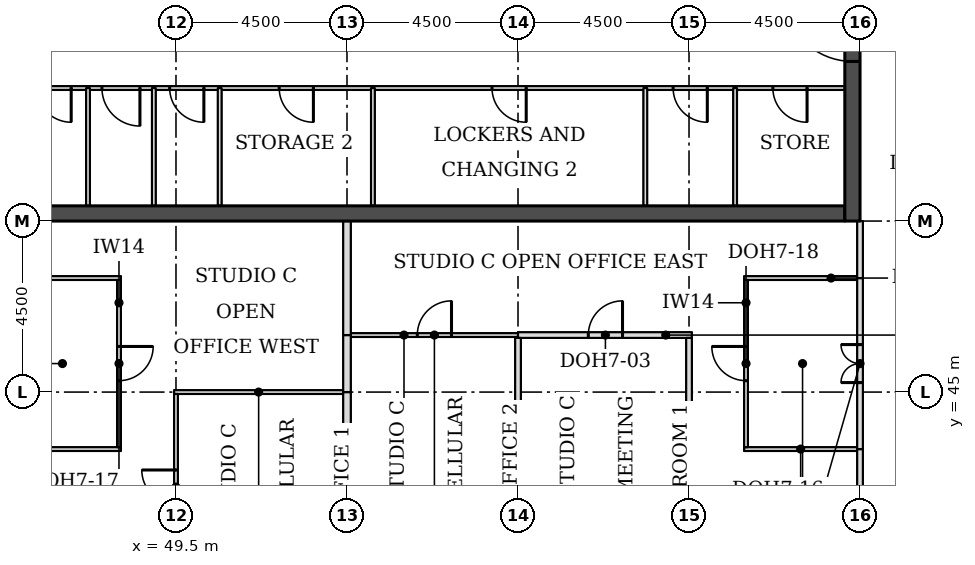
"""IFC4 building model, lengths in metres.
Left out: names, types, materials, properties, quantities, classifications, styles, units other than length and angle.
Written with IfcOpenShell. Run it as: python <this file> out.ifc"""

import sys

from ifc_helpers import new_model, si_unit, direction, frame, frame_2d, origin, place, context, subcontext, project, spatial, rectangle, extrude, element, fill, save


model = new_model("IFC4")
c1 = context("Model", 3, precision=1e-05, world=origin(), true_north=direction((0.0, 1.0)))
c2 = subcontext(c1, "Body", "Model", "MODEL_VIEW")
j1 = project(units=[si_unit("LENGTHUNIT", "METRE"), si_unit("PLANEANGLEUNIT", "RADIAN")], contexts=[c1])
p1 = place(None, origin())
s1 = spatial("IfcSite", under=j1, at=p1, CompositionType="ELEMENT")
p2 = place(p1, origin())
s2 = spatial("IfcBuilding", under=s1, at=p2, CompositionType="ELEMENT")
p3 = place(p2, frame((0.0, 0.0, 192.1)))
s3 = spatial("IfcBuildingStorey", under=s2, at=p3, CompositionType="ELEMENT", Elevation=192.1)
p4 = place(p3, frame((45.4, 49.7, 0.0), z_axis=(0.0, 0.0, 1.0), x_axis=(1.0, 0.0, 0.0)))
e1 = element("IfcWall", 1, at=p4, inside=s3, PredefinedType="SHEAR", context=c2, shape_type="SweptSolid", body=[
    extrude(rectangle(XDim=21.7, YDim=0.4, at=frame_2d((10.85, 0.0))), origin(), (0.0, 0.0, 1.0), 3.7),
])
p5 = place(p3, frame((67.3, 49.5, 0.0), z_axis=(0.0, 0.0, 1.0), x_axis=(0.0, 1.0, 0.0)))
e2 = element("IfcWall", 2, at=p5, inside=s3, PredefinedType="SHEAR", context=c2, shape_type="SweptSolid", body=[
    extrude(rectangle(XDim=22.5, YDim=0.4, at=frame_2d((11.25, 0.0))), origin(), (0.0, 0.0, 1.0), 3.7),
])
p6 = place(p5, frame((4.2, 0.0, 0.0)))
e3 = element("IfcOpeningElement", 3, at=p6, cuts=e2, PredefinedType="OPENING", context=c2, shape_type="SweptSolid", body=[
    extrude(rectangle(XDim=1.8, YDim=2.1, at=frame_2d((0.9, 1.05))), frame((0.0, 0.21, 0.0), z_axis=(0.0, -1.0, 0.0), x_axis=(1.0, 0.0, 0.0)), (0.0, 0.0, 1.0), 0.42),
])
p7 = place(p5, frame((6.9, 0.0, 0.0)))
e4 = element("IfcOpeningElement", 4, at=p7, cuts=e2, PredefinedType="OPENING", context=c2, shape_type="SweptSolid", body=[
    extrude(rectangle(XDim=1.1, YDim=2.1, at=frame_2d((0.55, 1.05))), frame((0.0, 0.21, 0.0), z_axis=(0.0, -1.0, 0.0), x_axis=(1.0, 0.0, 0.0)), (0.0, 0.0, 1.0), 0.42),
])
p8 = place(p5, frame((13.6, 0.0, 0.0)))
e5 = element("IfcOpeningElement", 5, at=p8, cuts=e2, PredefinedType="OPENING", context=c2, shape_type="SweptSolid", body=[
    extrude(rectangle(XDim=1.1, YDim=2.1, at=frame_2d((0.55, 1.05))), frame((0.0, 0.21, 0.0), z_axis=(0.0, -1.0, 0.0), x_axis=(1.0, 0.0, 0.0)), (0.0, 0.0, 1.0), 0.42),
])
p9 = place(p5, frame((16.5, 0.0, 0.0)))
e6 = element("IfcOpeningElement", 6, at=p9, cuts=e2, PredefinedType="OPENING", context=c2, shape_type="SweptSolid", body=[
    extrude(rectangle(XDim=1.8, YDim=2.1, at=frame_2d((0.9, 1.05))), frame((0.0, 0.21, 0.0), z_axis=(0.0, -1.0, 0.0), x_axis=(1.0, 0.0, 0.0)), (0.0, 0.0, 1.0), 0.42),
])
for number, where, z_axis, x_axis in (
    (7, (45.075, 43.5, 0.0), (0.0, 0.0, 1.0), (1.0, 0.0, 0.0)),
    (8, (64.45, 43.5, 0.0), (0.0, 0.0, 1.0), (1.0, 0.0, 0.0)),
):
    element("IfcWall", number, at=place(p3, frame(where, z_axis=z_axis, x_axis=x_axis)), inside=s3, PredefinedType="PARTITIONING", context=c2, shape_type="SweptSolid", body=[
        extrude(rectangle(XDim=2.975, YDim=0.1, at=frame_2d((1.488, 0.0))), origin(), (0.0, 0.0, 1.0), 3.55),
    ])
p10 = place(p3, frame((49.45, 45.0, 0.0), z_axis=(0.0, 0.0, 1.0), x_axis=(1.0, 0.0, 0.0)))
e9 = element("IfcWall", 9, at=p10, inside=s3, PredefinedType="PARTITIONING", context=c2, shape_type="SweptSolid", body=[
    extrude(rectangle(XDim=4.45, YDim=0.1, at=frame_2d((2.225, 0.0))), origin(), (0.0, 0.0, 1.0), 3.55),
])
p11 = place(p3, frame((54.1, 46.5, 0.0), z_axis=(0.0, 0.0, 1.0), x_axis=(1.0, 0.0, 0.0)))
e10 = element("IfcWall", 10, at=p11, inside=s3, PredefinedType="PARTITIONING", context=c2, shape_type="SweptSolid", body=[
    extrude(rectangle(XDim=4.4, YDim=0.1, at=frame_2d((2.2, 0.0))), origin(), (0.0, 0.0, 1.0), 3.55),
])
p12 = place(p11, frame((1.75, 0.0, 0.0)))
e11 = element("IfcOpeningElement", 11, at=p12, cuts=e10, PredefinedType="OPENING", context=c2, shape_type="SweptSolid", body=[
    extrude(rectangle(XDim=0.9, YDim=2.1, at=frame_2d((0.45, 1.05))), frame((0.0, 0.06, 0.0), z_axis=(0.0, -1.0, 0.0), x_axis=(1.0, 0.0, 0.0)), (0.0, 0.0, 1.0), 0.12),
])
p13 = place(p3, frame((58.5, 46.5, 0.0), z_axis=(0.0, 0.0, 1.0), x_axis=(1.0, 0.0, 0.0)))
e12 = element("IfcWall", 12, at=p13, inside=s3, PredefinedType="PARTITIONING", context=c2, shape_type="SweptSolid", body=[
    extrude(rectangle(XDim=4.575, YDim=0.15, at=frame_2d((2.288, 0.0))), origin(), (0.0, 0.0, 1.0), 3.55),
])
p14 = place(p13, frame((1.85, 0.0, 0.0)))
e13 = element("IfcOpeningElement", 13, at=p14, cuts=e12, PredefinedType="OPENING", context=c2, shape_type="SweptSolid", body=[
    extrude(rectangle(XDim=0.9, YDim=2.1, at=frame_2d((0.45, 1.05))), frame((0.0, 0.085, 0.0), z_axis=(0.0, -1.0, 0.0), x_axis=(1.0, 0.0, 0.0)), (0.0, 0.0, 1.0), 0.17),
])
for number, where, z_axis, x_axis in (
    (14, (45.075, 48.0, 0.0), (0.0, 0.0, 1.0), (1.0, 0.0, 0.0)),
    (15, (64.45, 48.0, 0.0), (0.0, 0.0, 1.0), (1.0, 0.0, 0.0)),
):
    element("IfcWall", number, at=place(p3, frame(where, z_axis=z_axis, x_axis=x_axis)), inside=s3, PredefinedType="PARTITIONING", context=c2, shape_type="SweptSolid", body=[
        extrude(rectangle(XDim=2.975, YDim=0.1, at=frame_2d((1.488, 0.0))), origin(), (0.0, 0.0, 1.0), 3.55),
    ])
p15 = place(p3, frame((49.5, 40.05, 0.0), z_axis=(0.0, 0.0, 1.0), x_axis=(0.0, 1.0, 0.0)))
e16 = element("IfcWall", 16, at=p15, inside=s3, PredefinedType="PARTITIONING", context=c2, shape_type="SweptSolid", body=[
    extrude(rectangle(XDim=4.9, YDim=0.1, at=frame_2d((2.45, 0.0))), origin(), (0.0, 0.0, 1.0), 3.55),
])
p16 = place(p15, frame((2.0, 0.0, 0.0)))
e17 = element("IfcOpeningElement", 17, at=p16, cuts=e16, PredefinedType="OPENING", context=c2, shape_type="SweptSolid", body=[
    extrude(rectangle(XDim=0.9, YDim=2.1, at=frame_2d((0.45, 1.05))), frame((0.0, 0.06, 0.0), z_axis=(0.0, -1.0, 0.0), x_axis=(1.0, 0.0, 0.0)), (0.0, 0.0, 1.0), 0.12),
])
p17 = place(p3, frame((54.0, 40.05, 0.0), z_axis=(0.0, 0.0, 1.0), x_axis=(0.0, 1.0, 0.0)))
e18 = element("IfcWall", 18, at=p17, inside=s3, PredefinedType="PARTITIONING", context=c2, shape_type="SweptSolid", body=[
    extrude(rectangle(XDim=4.95, YDim=0.2, at=frame_2d((2.475, 0.0))), origin(), (0.0, 0.0, 1.0), 3.55),
])
for number, where, z_axis, x_axis in (
    (19, (58.5, 40.05, 0.0), (0.0, 0.0, 1.0), (0.0, 1.0, 0.0)),
    (20, (63.0, 40.05, 0.0), (0.0, 0.0, 1.0), (0.0, 1.0, 0.0)),
):
    element("IfcWall", number, at=place(p3, frame(where, z_axis=z_axis, x_axis=x_axis)), inside=s3, PredefinedType="PARTITIONING", context=c2, shape_type="SweptSolid", body=[
        extrude(rectangle(XDim=6.375, YDim=0.15, at=frame_2d((3.188, 0.0))), origin(), (0.0, 0.0, 1.0), 3.55),
    ])
p18 = place(p3, frame((67.5, 40.05, 0.0), z_axis=(0.0, 0.0, 1.0), x_axis=(0.0, 1.0, 0.0)))
e21 = element("IfcWall", 21, at=p18, inside=s3, PredefinedType="PARTITIONING", context=c2, shape_type="SweptSolid", body=[
    extrude(rectangle(XDim=3.45, YDim=0.15, at=frame_2d((1.725, 0.0))), origin(), (0.0, 0.0, 1.0), 3.022),
])
p19 = place(p3, frame((67.5, 43.5, 0.0), z_axis=(0.0, 0.0, 1.0), x_axis=(0.0, 1.0, 0.0)))
e22 = element("IfcWall", 22, at=p19, inside=s3, PredefinedType="PARTITIONING", context=c2, shape_type="SweptSolid", body=[
    extrude(rectangle(XDim=4.5, YDim=0.15, at=frame_2d((2.25, 0.0))), origin(), (0.0, 0.0, 1.0), 3.022),
])
p20 = place(p19, frame((1.75, 0.0, 0.0)))
e23 = element("IfcOpeningElement", 23, at=p20, cuts=e22, PredefinedType="OPENING", context=c2, shape_type="SweptSolid", body=[
    extrude(rectangle(XDim=1.0, YDim=2.1, at=frame_2d((0.5, 1.05))), frame((0.0, 0.085, 0.0), z_axis=(0.0, -1.0, 0.0), x_axis=(1.0, 0.0, 0.0)), (0.0, 0.0, 1.0), 0.17),
])
p21 = place(p3, frame((48.0, 43.55, 0.0), z_axis=(0.0, 0.0, 1.0), x_axis=(0.0, 1.0, 0.0)))
e24 = element("IfcWall", 24, at=p21, inside=s3, PredefinedType="PARTITIONING", context=c2, shape_type="SweptSolid", body=[
    extrude(rectangle(XDim=4.4, YDim=0.1, at=frame_2d((2.2, 0.0))), origin(), (0.0, 0.0, 1.0), 3.55),
])
p22 = place(p21, frame((1.75, 0.0, 0.0)))
e25 = element("IfcOpeningElement", 25, at=p22, cuts=e24, PredefinedType="OPENING", context=c2, shape_type="SweptSolid", body=[
    extrude(rectangle(XDim=0.9, YDim=2.1, at=frame_2d((0.45, 1.05))), frame((0.0, 0.06, 0.0), z_axis=(0.0, -1.0, 0.0), x_axis=(1.0, 0.0, 0.0)), (0.0, 0.0, 1.0), 0.12),
])
p23 = place(p3, frame((64.5, 43.55, 0.0), z_axis=(0.0, 0.0, 1.0), x_axis=(0.0, 1.0, 0.0)))
e26 = element("IfcWall", 26, at=p23, inside=s3, PredefinedType="PARTITIONING", context=c2, shape_type="SweptSolid", body=[
    extrude(rectangle(XDim=4.4, YDim=0.1, at=frame_2d((2.2, 0.0))), origin(), (0.0, 0.0, 1.0), 3.55),
])
p24 = place(p23, frame((1.75, 0.0, 0.0)))
e27 = element("IfcOpeningElement", 27, at=p24, cuts=e26, PredefinedType="OPENING", context=c2, shape_type="SweptSolid", body=[
    extrude(rectangle(XDim=0.9, YDim=2.1, at=frame_2d((0.45, 1.05))), frame((0.0, 0.06, 0.0), z_axis=(0.0, -1.0, 0.0), x_axis=(1.0, 0.0, 0.0)), (0.0, 0.0, 1.0), 0.12),
])
p25 = place(p3, frame((54.0, 45.0, 0.0), z_axis=(0.0, 0.0, 1.0), x_axis=(0.0, 1.0, 0.0)))
e28 = element("IfcWall", 28, at=p25, inside=s3, PredefinedType="PARTITIONING", context=c2, shape_type="SweptSolid", body=[
    extrude(rectangle(XDim=1.5, YDim=0.2, at=frame_2d((0.75, 0.0))), origin(), (0.0, 0.0, 1.0), 3.55),
])
p26 = place(p3, frame((54.0, 46.5, 0.0), z_axis=(0.0, 0.0, 1.0), x_axis=(0.0, 1.0, 0.0)))
e29 = element("IfcWall", 29, at=p26, inside=s3, PredefinedType="PARTITIONING", context=c2, shape_type="SweptSolid", body=[
    extrude(rectangle(XDim=3.0, YDim=0.2, at=frame_2d((1.5, 0.0))), origin(), (0.0, 0.0, 1.0), 3.55),
])
p27 = place(p3, frame((67.5, 48.0, 0.0), z_axis=(0.0, 0.0, 1.0), x_axis=(0.0, 1.0, 0.0)))
e30 = element("IfcWall", 30, at=p27, inside=s3, PredefinedType="PARTITIONING", context=c2, shape_type="SweptSolid", body=[
    extrude(rectangle(XDim=1.5, YDim=0.15, at=frame_2d((0.75, 0.0))), origin(), (0.0, 0.0, 1.0), 3.022),
])
p28 = place(p3, frame((45.4, 53.0, 0.0), z_axis=(0.0, 0.0, 1.0), x_axis=(1.0, 0.0, 0.0)))
e31 = element("IfcWall", 31, at=p28, inside=s3, PredefinedType="PARTITIONING", context=c2, shape_type="SweptSolid", body=[
    extrude(rectangle(XDim=21.7, YDim=0.1, at=frame_2d((10.85, 0.0))), origin(), (0.0, 0.0, 1.0), 3.55),
])
p29 = place(p28, frame((19.806, 0.0, 0.0)))
e32 = element("IfcOpeningElement", 32, at=p29, cuts=e31, PredefinedType="OPENING", context=c2, shape_type="SweptSolid", body=[
    extrude(rectangle(XDim=0.9, YDim=2.1, at=frame_2d((0.45, 1.05))), frame((0.0, 0.06, 0.0), z_axis=(0.0, -1.0, 0.0), x_axis=(1.0, 0.0, 0.0)), (0.0, 0.0, 1.0), 0.12),
])
p30 = place(p28, frame((17.181, 0.0, 0.0)))
e33 = element("IfcOpeningElement", 33, at=p30, cuts=e31, PredefinedType="OPENING", context=c2, shape_type="SweptSolid", body=[
    extrude(rectangle(XDim=0.9, YDim=2.1, at=frame_2d((0.45, 1.05))), frame((0.0, 0.06, 0.0), z_axis=(0.0, -1.0, 0.0), x_axis=(1.0, 0.0, 0.0)), (0.0, 0.0, 1.0), 0.12),
])
p31 = place(p28, frame((0.442, 0.0, 0.0)))
e34 = element("IfcOpeningElement", 34, at=p31, cuts=e31, PredefinedType="OPENING", context=c2, shape_type="SweptSolid", body=[
    extrude(rectangle(XDim=0.9, YDim=2.1, at=frame_2d((0.45, 1.05))), frame((0.0, 0.06, 0.0), z_axis=(0.0, -1.0, 0.0), x_axis=(1.0, 0.0, 0.0)), (0.0, 0.0, 1.0), 0.12),
])
p32 = place(p28, frame((2.151, 0.0, 0.0)))
e35 = element("IfcOpeningElement", 35, at=p32, cuts=e31, PredefinedType="OPENING", context=c2, shape_type="SweptSolid", body=[
    extrude(rectangle(XDim=1.0, YDim=2.1, at=frame_2d((0.5, 1.05))), frame((0.0, 0.06, 0.0), z_axis=(0.0, -1.0, 0.0), x_axis=(1.0, 0.0, 0.0)), (0.0, 0.0, 1.0), 0.12),
])
p33 = place(p28, frame((3.934, 0.0, 0.0)))
e36 = element("IfcOpeningElement", 36, at=p33, cuts=e31, PredefinedType="OPENING", context=c2, shape_type="SweptSolid", body=[
    extrude(rectangle(XDim=0.9, YDim=2.1, at=frame_2d((0.45, 1.05))), frame((0.0, 0.06, 0.0), z_axis=(0.0, -1.0, 0.0), x_axis=(1.0, 0.0, 0.0)), (0.0, 0.0, 1.0), 0.12),
])
p34 = place(p28, frame((6.816, 0.0, 0.0)))
e37 = element("IfcOpeningElement", 37, at=p34, cuts=e31, PredefinedType="OPENING", context=c2, shape_type="SweptSolid", body=[
    extrude(rectangle(XDim=0.9, YDim=2.1, at=frame_2d((0.45, 1.05))), frame((0.0, 0.06, 0.0), z_axis=(0.0, -1.0, 0.0), x_axis=(1.0, 0.0, 0.0)), (0.0, 0.0, 1.0), 0.12),
])
p35 = place(p28, frame((12.416, 0.0, 0.0)))
e38 = element("IfcOpeningElement", 38, at=p35, cuts=e31, PredefinedType="OPENING", context=c2, shape_type="SweptSolid", body=[
    extrude(rectangle(XDim=0.9, YDim=2.1, at=frame_2d((0.45, 1.05))), frame((0.0, 0.06, 0.0), z_axis=(0.0, -1.0, 0.0), x_axis=(1.0, 0.0, 0.0)), (0.0, 0.0, 1.0), 0.12),
])
for number, where, z_axis, x_axis in (
    (39, (47.185, 49.9, 0.0), (0.0, 0.0, 1.0), (0.0, 1.0, 0.0)),
    (40, (48.917, 49.9, 0.0), (0.0, 0.0, 1.0), (0.0, 1.0, 0.0)),
    (41, (50.65, 49.9, 0.0), (0.0, 0.0, 1.0), (0.0, 1.0, 0.0)),
    (42, (54.682, 49.9, 0.0), (0.0, 0.0, 1.0), (0.0, 1.0, 0.0)),
    (43, (61.85, 49.9, 0.0), (0.0, 0.0, 1.0), (0.0, 1.0, 0.0)),
    (44, (64.212, 49.9, 0.0), (0.0, 0.0, 1.0), (0.0, 1.0, 0.0)),
):
    element("IfcWall", number, at=place(p3, frame(where, z_axis=z_axis, x_axis=x_axis)), inside=s3, PredefinedType="PARTITIONING", context=c2, shape_type="SweptSolid", body=[
        extrude(rectangle(XDim=3.1, YDim=0.1, at=frame_2d((1.55, 0.0))), origin(), (0.0, 0.0, 1.0), 3.55),
    ])
p36 = place(p22, frame((0.9, 0.0, 0.0), z_axis=(0.0, 0.0, 1.0), x_axis=(-1.0, 0.0, 0.0)))
e45 = element("IfcDoor", 45, at=p36, inside=s3, OperationType="SINGLE_SWING_LEFT", PredefinedType="DOOR", context=c2, shape_type="SweptSolid", body=[
    extrude(rectangle(XDim=0.9, YDim=2.1, at=frame_2d((0.45, 1.05))), frame((0.0, 0.025, 0.0), z_axis=(0.0, -1.0, 0.0), x_axis=(1.0, 0.0, 0.0)), (0.0, 0.0, 1.0), 0.05),
])
fill(e25, e45)
p37 = place(p16, origin())
e46 = element("IfcDoor", 46, at=p37, inside=s3, OperationType="SINGLE_SWING_RIGHT", PredefinedType="DOOR", context=c2, shape_type="SweptSolid", body=[
    extrude(rectangle(XDim=0.9, YDim=2.1, at=frame_2d((0.45, 1.05))), frame((0.0, 0.025, 0.0), z_axis=(0.0, -1.0, 0.0), x_axis=(1.0, 0.0, 0.0)), (0.0, 0.0, 1.0), 0.05),
])
fill(e17, e46)
p38 = place(p20, origin())
e47 = element("IfcDoor", 47, at=p38, inside=s3, OperationType="DOUBLE_DOOR_SINGLE_SWING", PredefinedType="DOOR", context=c2, shape_type="SweptSolid", body=[
    extrude(rectangle(XDim=1.0, YDim=2.1, at=frame_2d((0.5, 1.05))), frame((0.0, 0.025, 0.0), z_axis=(0.0, -1.0, 0.0), x_axis=(1.0, 0.0, 0.0)), (0.0, 0.0, 1.0), 0.05),
])
fill(e23, e47)
p39 = place(p24, origin())
e48 = element("IfcDoor", 48, at=p39, inside=s3, OperationType="SINGLE_SWING_RIGHT", PredefinedType="DOOR", context=c2, shape_type="SweptSolid", body=[
    extrude(rectangle(XDim=0.9, YDim=2.1, at=frame_2d((0.45, 1.05))), frame((0.0, 0.025, 0.0), z_axis=(0.0, -1.0, 0.0), x_axis=(1.0, 0.0, 0.0)), (0.0, 0.0, 1.0), 0.05),
])
fill(e27, e48)
p40 = place(p12, origin())
e49 = element("IfcDoor", 49, at=p40, inside=s3, OperationType="SINGLE_SWING_RIGHT", PredefinedType="DOOR", context=c2, shape_type="SweptSolid", body=[
    extrude(rectangle(XDim=0.9, YDim=2.1, at=frame_2d((0.45, 1.05))), frame((0.0, 0.025, 0.0), z_axis=(0.0, -1.0, 0.0), x_axis=(1.0, 0.0, 0.0)), (0.0, 0.0, 1.0), 0.05),
])
fill(e11, e49)
p41 = place(p14, origin())
e50 = element("IfcDoor", 50, at=p41, inside=s3, OperationType="SINGLE_SWING_RIGHT", PredefinedType="DOOR", context=c2, shape_type="SweptSolid", body=[
    extrude(rectangle(XDim=0.9, YDim=2.1, at=frame_2d((0.45, 1.05))), frame((0.0, 0.025, 0.0), z_axis=(0.0, -1.0, 0.0), x_axis=(1.0, 0.0, 0.0)), (0.0, 0.0, 1.0), 0.05),
])
fill(e13, e50)
p42 = place(p6, origin())
e51 = element("IfcDoor", 51, at=p42, inside=s3, OperationType="SINGLE_SWING_RIGHT", PredefinedType="DOOR", context=c2, shape_type="SweptSolid", body=[
    extrude(rectangle(XDim=1.8, YDim=2.1, at=frame_2d((0.9, 1.05))), frame((0.0, 0.025, 0.0), z_axis=(0.0, -1.0, 0.0), x_axis=(1.0, 0.0, 0.0)), (0.0, 0.0, 1.0), 0.05),
])
fill(e3, e51)
p43 = place(p29, frame((0.9, 0.0, 0.0), z_axis=(0.0, 0.0, 1.0), x_axis=(-1.0, 0.0, 0.0)))
e52 = element("IfcDoor", 52, at=p43, inside=s3, OperationType="SINGLE_SWING_LEFT", PredefinedType="DOOR", context=c2, shape_type="SweptSolid", body=[
    extrude(rectangle(XDim=0.9, YDim=2.1, at=frame_2d((0.45, 1.05))), frame((0.0, 0.025, 0.0), z_axis=(0.0, -1.0, 0.0), x_axis=(1.0, 0.0, 0.0)), (0.0, 0.0, 1.0), 0.05),
])
fill(e32, e52)
p44 = place(p30, frame((0.9, 0.0, 0.0), z_axis=(0.0, 0.0, 1.0), x_axis=(-1.0, 0.0, 0.0)))
e53 = element("IfcDoor", 53, at=p44, inside=s3, OperationType="SINGLE_SWING_LEFT", PredefinedType="DOOR", context=c2, shape_type="SweptSolid", body=[
    extrude(rectangle(XDim=0.9, YDim=2.1, at=frame_2d((0.45, 1.05))), frame((0.0, 0.025, 0.0), z_axis=(0.0, -1.0, 0.0), x_axis=(1.0, 0.0, 0.0)), (0.0, 0.0, 1.0), 0.05),
])
fill(e33, e53)
p45 = place(p31, frame((0.9, 0.0, 0.0), z_axis=(0.0, 0.0, 1.0), x_axis=(-1.0, 0.0, 0.0)))
e54 = element("IfcDoor", 54, at=p45, inside=s3, OperationType="SINGLE_SWING_LEFT", PredefinedType="DOOR", context=c2, shape_type="SweptSolid", body=[
    extrude(rectangle(XDim=0.9, YDim=2.1, at=frame_2d((0.45, 1.05))), frame((0.0, 0.025, 0.0), z_axis=(0.0, -1.0, 0.0), x_axis=(1.0, 0.0, 0.0)), (0.0, 0.0, 1.0), 0.05),
])
fill(e34, e54)
p46 = place(p32, frame((1.0, 0.0, 0.0), z_axis=(0.0, 0.0, 1.0), x_axis=(-1.0, 0.0, 0.0)))
e55 = element("IfcDoor", 55, at=p46, inside=s3, OperationType="SINGLE_SWING_LEFT", PredefinedType="DOOR", context=c2, shape_type="SweptSolid", body=[
    extrude(rectangle(XDim=1.0, YDim=2.1, at=frame_2d((0.5, 1.05))), frame((0.0, 0.025, 0.0), z_axis=(0.0, -1.0, 0.0), x_axis=(1.0, 0.0, 0.0)), (0.0, 0.0, 1.0), 0.05),
])
fill(e35, e55)
p47 = place(p33, frame((0.9, 0.0, 0.0), z_axis=(0.0, 0.0, 1.0), x_axis=(-1.0, 0.0, 0.0)))
e56 = element("IfcDoor", 56, at=p47, inside=s3, OperationType="SINGLE_SWING_LEFT", PredefinedType="DOOR", context=c2, shape_type="SweptSolid", body=[
    extrude(rectangle(XDim=0.9, YDim=2.1, at=frame_2d((0.45, 1.05))), frame((0.0, 0.025, 0.0), z_axis=(0.0, -1.0, 0.0), x_axis=(1.0, 0.0, 0.0)), (0.0, 0.0, 1.0), 0.05),
])
fill(e36, e56)
p48 = place(p34, frame((0.9, 0.0, 0.0), z_axis=(0.0, 0.0, 1.0), x_axis=(-1.0, 0.0, 0.0)))
e57 = element("IfcDoor", 57, at=p48, inside=s3, OperationType="SINGLE_SWING_LEFT", PredefinedType="DOOR", context=c2, shape_type="SweptSolid", body=[
    extrude(rectangle(XDim=0.9, YDim=2.1, at=frame_2d((0.45, 1.05))), frame((0.0, 0.025, 0.0), z_axis=(0.0, -1.0, 0.0), x_axis=(1.0, 0.0, 0.0)), (0.0, 0.0, 1.0), 0.05),
])
fill(e37, e57)
p49 = place(p35, frame((0.9, 0.0, 0.0), z_axis=(0.0, 0.0, 1.0), x_axis=(-1.0, 0.0, 0.0)))
e58 = element("IfcDoor", 58, at=p49, inside=s3, OperationType="SINGLE_SWING_LEFT", PredefinedType="DOOR", context=c2, shape_type="SweptSolid", body=[
    extrude(rectangle(XDim=0.9, YDim=2.1, at=frame_2d((0.45, 1.05))), frame((0.0, 0.025, 0.0), z_axis=(0.0, -1.0, 0.0), x_axis=(1.0, 0.0, 0.0)), (0.0, 0.0, 1.0), 0.05),
])
fill(e38, e58)
save(model, sys.argv[1])
